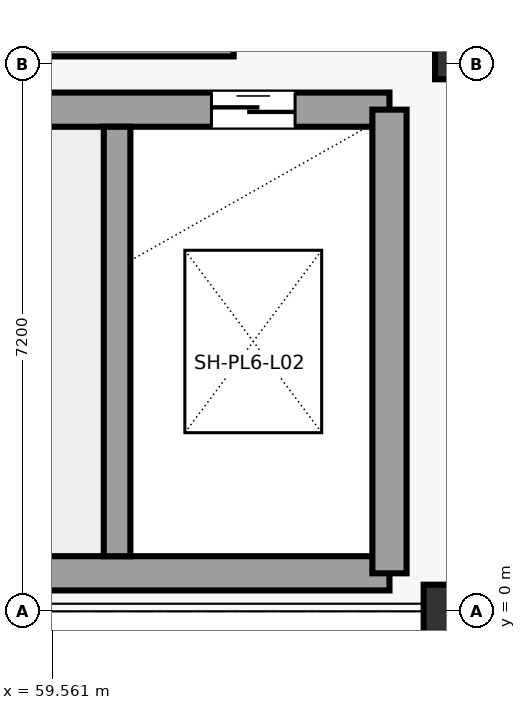
"""IFC4 building model, lengths in metres.
Left out: names, types, materials, properties, quantities, classifications, styles, units other than length and angle.
Written with IfcOpenShell. Run it as: python <this file> out.ifc"""

import sys

from ifc_helpers import new_model, si_unit, direction, frame, frame_2d, origin, origin_2d, place, context, subcontext, project, spatial, rectangle, hollow_rectangle, extrude, element, fill, save


model = new_model("IFC4")
c1 = context("Model", 3, precision=1e-05, world=origin(), true_north=direction((0.0, 1.0)))
c2 = subcontext(c1, "Body", "Model", "MODEL_VIEW")
j1 = project(units=[si_unit("LENGTHUNIT", "METRE"), si_unit("PLANEANGLEUNIT", "RADIAN")], contexts=[c1])
p1 = place(None, origin())
s1 = spatial("IfcSite", under=j1, at=p1, CompositionType="ELEMENT")
p2 = place(p1, origin())
s2 = spatial("IfcBuilding", under=s1, at=p2, CompositionType="ELEMENT")
p3 = place(p2, frame((0.0, 0.0, 9.6)))
s3 = spatial("IfcBuildingStorey", under=s2, at=p3, CompositionType="ELEMENT", Elevation=9.6)
p4 = place(p3, frame((64.8, 0.0, 0.0), z_axis=(0.0, 0.0, 1.0), x_axis=(1.0, 0.0, 0.0)))
e1 = element("IfcColumn", 1, at=p4, inside=s3, PredefinedType="COLUMN", context=c2, shape_type="SweptSolid", body=[
    extrude(rectangle(XDim=0.7, YDim=0.7, at=origin_2d()), origin(), (0.0, 0.0, 1.0), 4.2),
])
p5 = place(p3, frame((64.8, 7.2, 0.0), z_axis=(0.0, 0.0, 1.0), x_axis=(1.0, 0.0, 0.0)))
e2 = element("IfcColumn", 2, at=p5, inside=s3, PredefinedType="COLUMN", context=c2, shape_type="SweptSolid", body=[
    extrude(hollow_rectangle(XDim=0.4, YDim=0.4, WallThickness=0.02, at=origin_2d()), origin(), (0.0, 0.0, 1.0), 4.2),
])
p6 = place(p3, frame((51.2, 0.5, 0.0), z_axis=(0.0, 0.0, 1.0), x_axis=(1.0, 0.0, 0.0)))
e3 = element("IfcWall", 3, at=p6, inside=s3, PredefinedType="SHEAR", context=c2, shape_type="SweptSolid", body=[
    extrude(rectangle(XDim=12.8, YDim=0.45, at=frame_2d((6.4, 0.0))), origin(), (0.0, 0.0, 1.0), 3.88),
])
p7 = place(p3, frame((51.2, 6.6, 0.0), z_axis=(0.0, 0.0, 1.0), x_axis=(1.0, 0.0, 0.0)))
e4 = element("IfcWall", 4, at=p7, inside=s3, PredefinedType="SHEAR", context=c2, shape_type="SweptSolid", body=[
    extrude(rectangle(XDim=12.8, YDim=0.45, at=frame_2d((6.4, 0.0))), origin(), (0.0, 0.0, 1.0), 3.88),
])
p8 = place(p7, frame((0.55, 0.0, 0.0)))
e5 = element("IfcOpeningElement", 5, at=p8, cuts=e4, PredefinedType="OPENING", context=c2, shape_type="SweptSolid", body=[
    extrude(rectangle(XDim=1.2, YDim=2.25, at=frame_2d((0.6, 1.125))), frame((0.0, 0.235, 0.0), z_axis=(0.0, -1.0, 0.0), x_axis=(1.0, 0.0, 0.0)), (0.0, 0.0, 1.0), 0.47),
])
p9 = place(p7, frame((10.458, 0.0, 0.0)))
e6 = element("IfcOpeningElement", 6, at=p9, cuts=e4, PredefinedType="OPENING", context=c2, shape_type="SweptSolid", body=[
    extrude(rectangle(XDim=1.1, YDim=2.2, at=frame_2d((0.55, 1.1))), frame((0.0, 0.235, 0.0), z_axis=(0.0, -1.0, 0.0), x_axis=(1.0, 0.0, 0.0)), (0.0, 0.0, 1.0), 0.47),
])
p10 = place(p3, frame((64.0, 0.5, 0.0), z_axis=(0.0, 0.0, 1.0), x_axis=(0.0, 1.0, 0.0)))
e7 = element("IfcWall", 7, at=p10, inside=s3, PredefinedType="SHEAR", context=c2, shape_type="SweptSolid", body=[
    extrude(rectangle(XDim=6.1, YDim=0.45, at=frame_2d((3.05, 0.0))), origin(), (0.0, 0.0, 1.0), 3.88),
])
p11 = place(p3, frame((60.416, 0.725, 0.0), z_axis=(0.0, 0.0, 1.0), x_axis=(0.0, 1.0, 0.0)))
e8 = element("IfcWall", 8, at=p11, inside=s3, PredefinedType="SHEAR", context=c2, shape_type="SweptSolid", body=[
    extrude(rectangle(XDim=5.65, YDim=0.35, at=frame_2d((2.825, 0.0))), origin(), (0.0, 0.0, 1.0), 3.88),
])
p12 = place(p3, frame((58.5, 7.4, 0.0), z_axis=(0.0, 0.0, 1.0), x_axis=(1.0, 0.0, 0.0)))
e9 = element("IfcWall", 9, at=p12, inside=s3, PredefinedType="PARTITIONING", context=c2, shape_type="SweptSolid", body=[
    extrude(rectangle(XDim=3.45, YDim=0.2, at=frame_2d((1.725, 0.0))), origin(), (0.0, 0.0, 1.0), 2.94),
])
p13 = place(p9, origin())
e10 = element("IfcDoor", 10, at=p13, inside=s3, OperationType="SLIDING_TO_LEFT", PredefinedType="DOOR", context=c2, shape_type="SweptSolid", body=[
    extrude(rectangle(XDim=1.1, YDim=2.2, at=frame_2d((0.55, 1.1))), frame((0.0, 0.025, 0.0), z_axis=(0.0, -1.0, 0.0), x_axis=(1.0, 0.0, 0.0)), (0.0, 0.0, 1.0), 0.05),
])
fill(e6, e10)
save(model, sys.argv[1])
